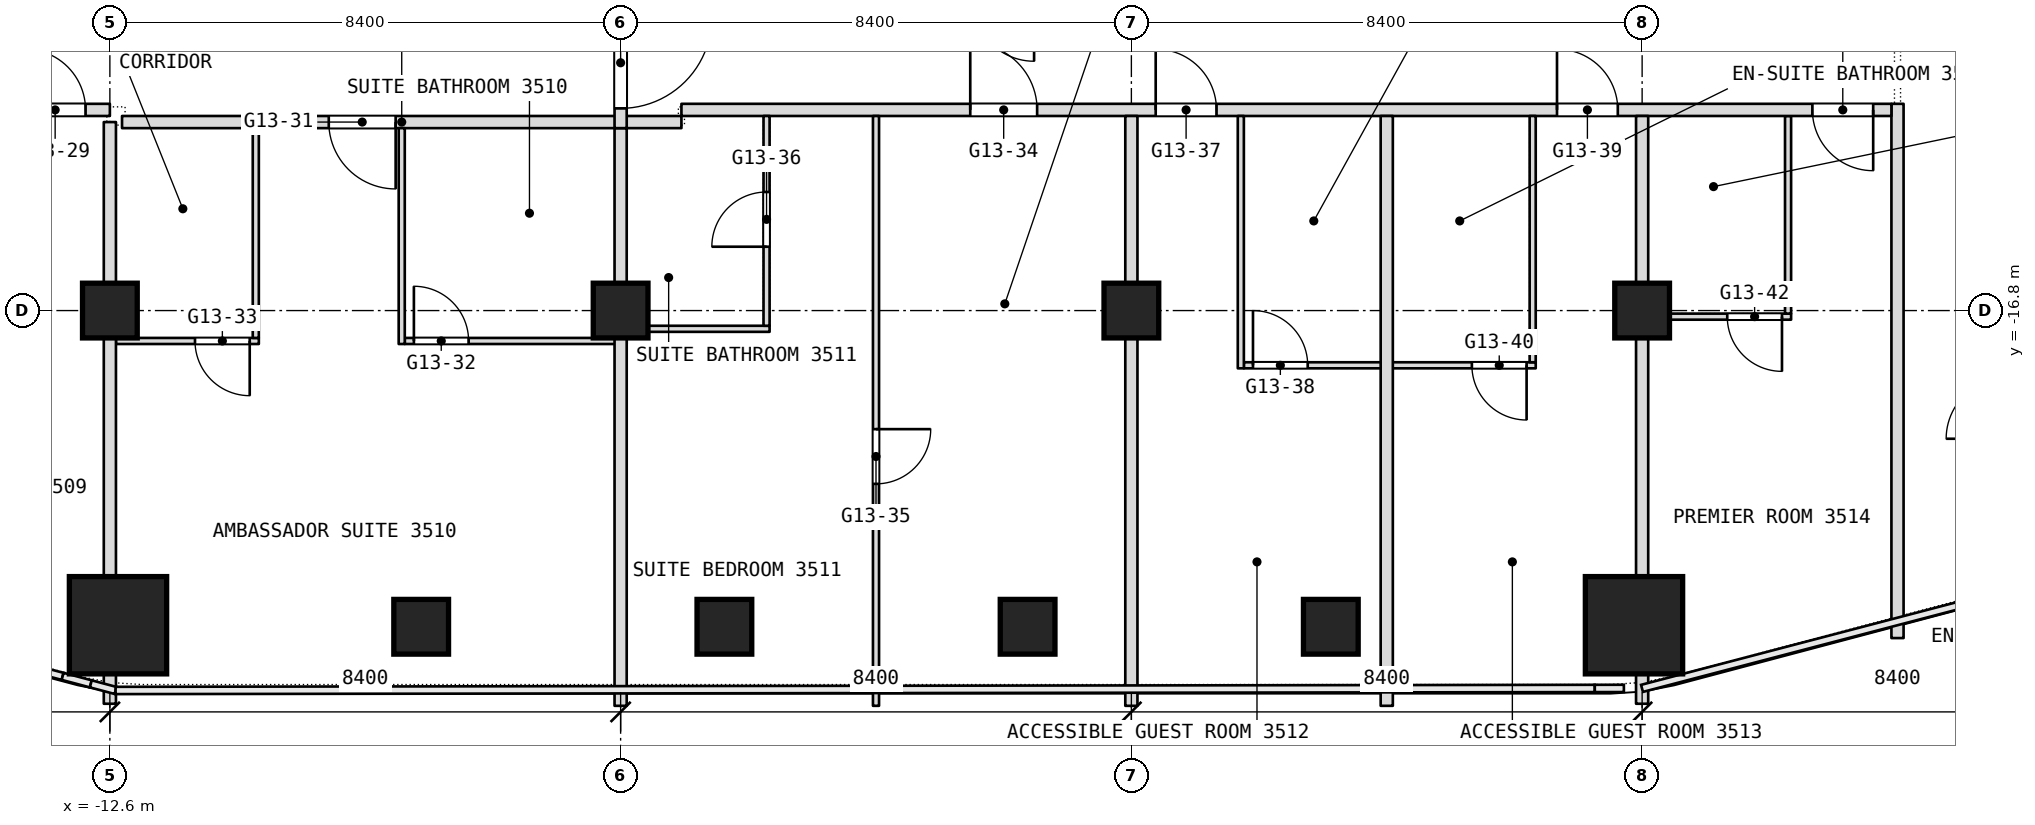
"""IFC4 building model, lengths in metres.
Left out: names, types, materials, properties, quantities, classifications, styles, units other than length and angle.
Written with IfcOpenShell. Run it as: python <this file> out.ifc"""

import sys

from ifc_helpers import new_model, si_unit, direction, frame, frame_2d, origin, origin_2d, place, context, subcontext, project, spatial, rectangle, extrude, element, fill, save


model = new_model("IFC4")
c1 = context("Model", 3, precision=1e-05, world=origin(), true_north=direction((0.0, 1.0)))
c2 = subcontext(c1, "Body", "Model", "MODEL_VIEW")
j1 = project(units=[si_unit("LENGTHUNIT", "METRE"), si_unit("PLANEANGLEUNIT", "RADIAN")], contexts=[c1])
p1 = place(None, origin())
s1 = spatial("IfcSite", under=j1, at=p1, CompositionType="ELEMENT")
p2 = place(p1, origin())
s2 = spatial("IfcBuilding", under=s1, at=p2, CompositionType="ELEMENT")
p3 = place(p2, frame((0.0, 0.0, 151.7)))
s3 = spatial("IfcBuildingStorey", under=s2, at=p3, CompositionType="ELEMENT", Elevation=151.7)
for number, where, z_axis, x_axis in (
    (1, (-12.466, -21.975, 0.0), (0.0, 0.0, 1.0), (1.0, 0.0, 0.0)),
    (2, (12.466, -21.975, 0.0), (0.0, 0.0, 1.0), (1.0, 0.0, 0.0)),
):
    element("IfcColumn", number, at=place(p3, frame(where, z_axis=z_axis, x_axis=x_axis)), inside=s3, PredefinedType="COLUMN", context=c2, shape_type="SweptSolid", body=[
        extrude(rectangle(XDim=1.6, YDim=1.6, at=origin_2d()), origin(), (0.0, 0.0, 1.0), 3.6),
    ])
for number, where, z_axis, x_axis in (
    (3, (-12.6, -16.8, 0.0), (0.0, 0.0, 1.0), (1.0, 0.0, 0.0)),
    (4, (-4.2, -16.8, 0.0), (0.0, 0.0, 1.0), (1.0, 0.0, 0.0)),
    (5, (4.2, -16.8, 0.0), (0.0, 0.0, 1.0), (1.0, 0.0, 0.0)),
    (6, (12.6, -16.8, 0.0), (0.0, 0.0, 1.0), (1.0, 0.0, 0.0)),
    (7, (7.48, -22.0, 0.0), (0.0, 0.0, 1.0), (1.0, 0.0, 0.0)),
    (8, (2.493, -22.0, 0.0), (0.0, 0.0, 1.0), (1.0, 0.0, 0.0)),
    (9, (-2.493, -22.0, 0.0), (0.0, 0.0, 1.0), (1.0, 0.0, 0.0)),
    (10, (-7.48, -22.0, 0.0), (0.0, 0.0, 1.0), (1.0, 0.0, 0.0)),
):
    element("IfcColumn", number, at=place(p3, frame(where, z_axis=z_axis, x_axis=x_axis)), inside=s3, PredefinedType="COLUMN", context=c2, shape_type="SweptSolid", body=[
        extrude(rectangle(XDim=0.9, YDim=0.9, at=origin_2d()), origin(), (0.0, 0.0, 1.0), 3.6),
    ])
p4 = place(p3, frame((6.05, -17.7, 0.0), z_axis=(0.0, 0.0, 1.0), x_axis=(1.0, 0.0, 0.0)))
e11 = element("IfcWall", 11, at=p4, inside=s3, PredefinedType="PARTITIONING", context=c2, shape_type="SweptSolid", body=[
    extrude(rectangle(XDim=4.8, YDim=0.1, at=frame_2d((2.4, 0.0))), origin(), (0.0, 0.0, 1.0), 3.34),
])
p5 = place(p4, frame((0.15, 0.0, 0.0)))
e12 = element("IfcOpeningElement", 12, at=p5, cuts=e11, PredefinedType="OPENING", context=c2, shape_type="SweptSolid", body=[
    extrude(rectangle(XDim=0.9, YDim=2.1, at=frame_2d((0.45, 1.05))), frame((0.0, 0.05, 0.0), z_axis=(0.0, -1.0, 0.0), x_axis=(1.0, 0.0, 0.0)), (0.0, 0.0, 1.0), 0.1),
])
p6 = place(p4, frame((3.75, 0.0, 0.0)))
e13 = element("IfcOpeningElement", 13, at=p6, cuts=e11, PredefinedType="OPENING", context=c2, shape_type="SweptSolid", body=[
    extrude(rectangle(XDim=0.9, YDim=2.1, at=frame_2d((0.45, 1.05))), frame((0.0, 0.05, 0.0), z_axis=(0.0, -1.0, 0.0), x_axis=(1.0, 0.0, 0.0)), (0.0, 0.0, 1.0), 0.1),
])
p7 = place(p3, frame((-12.5, -17.3, 0.0), z_axis=(0.0, 0.0, 1.0), x_axis=(1.0, 0.0, 0.0)))
e14 = element("IfcWall", 14, at=p7, inside=s3, PredefinedType="PARTITIONING", context=c2, shape_type="SweptSolid", body=[
    extrude(rectangle(XDim=2.35, YDim=0.1, at=frame_2d((1.175, 0.0))), origin(), (0.0, 0.0, 1.0), 3.34),
])
p8 = place(p7, frame((1.3, 0.0, 0.0)))
e15 = element("IfcOpeningElement", 15, at=p8, cuts=e14, PredefinedType="OPENING", context=c2, shape_type="SweptSolid", body=[
    extrude(rectangle(XDim=0.9, YDim=2.1, at=frame_2d((0.45, 1.05))), frame((0.0, 0.05, 0.0), z_axis=(0.0, -1.0, 0.0), x_axis=(1.0, 0.0, 0.0)), (0.0, 0.0, 1.0), 0.1),
])
p9 = place(p3, frame((-7.75, -17.3, 0.0), z_axis=(0.0, 0.0, 1.0), x_axis=(1.0, 0.0, 0.0)))
e16 = element("IfcWall", 16, at=p9, inside=s3, PredefinedType="PARTITIONING", context=c2, shape_type="SweptSolid", body=[
    extrude(rectangle(XDim=3.65, YDim=0.1, at=frame_2d((1.825, 0.0))), origin(), (0.0, 0.0, 1.0), 3.34),
])
p10 = place(p9, frame((0.15, 0.0, 0.0)))
e17 = element("IfcOpeningElement", 17, at=p10, cuts=e16, PredefinedType="OPENING", context=c2, shape_type="SweptSolid", body=[
    extrude(rectangle(XDim=0.9, YDim=2.1, at=frame_2d((0.45, 1.05))), frame((0.0, 0.05, 0.0), z_axis=(0.0, -1.0, 0.0), x_axis=(1.0, 0.0, 0.0)), (0.0, 0.0, 1.0), 0.1),
])
p11 = place(p3, frame((-4.1, -17.1, 0.0), z_axis=(0.0, 0.0, 1.0), x_axis=(1.0, 0.0, 0.0)))
e18 = element("IfcWall", 18, at=p11, inside=s3, PredefinedType="PARTITIONING", context=c2, shape_type="SweptSolid", body=[
    extrude(rectangle(XDim=2.35, YDim=0.1, at=frame_2d((1.175, 0.0))), origin(), (0.0, 0.0, 1.0), 3.34),
])
p12 = place(p3, frame((12.7, -16.9, 0.0), z_axis=(0.0, 0.0, 1.0), x_axis=(1.0, 0.0, 0.0)))
e19 = element("IfcWall", 19, at=p12, inside=s3, PredefinedType="PARTITIONING", context=c2, shape_type="SweptSolid", body=[
    extrude(rectangle(XDim=2.35, YDim=0.1, at=frame_2d((1.175, 0.0))), origin(), (0.0, 0.0, 1.0), 2.89),
])
p13 = place(p12, frame((1.3, 0.0, 0.0)))
e20 = element("IfcOpeningElement", 20, at=p13, cuts=e19, PredefinedType="OPENING", context=c2, shape_type="SweptSolid", body=[
    extrude(rectangle(XDim=0.9, YDim=2.1, at=frame_2d((0.45, 1.05))), frame((0.0, 0.05, 0.0), z_axis=(0.0, -1.0, 0.0), x_axis=(1.0, 0.0, 0.0)), (0.0, 0.0, 1.0), 0.1),
])
p14 = place(p3, frame((16.8, -22.186, 0.0), z_axis=(0.0, 0.0, 1.0), x_axis=(0.0, 1.0, 0.0)))
e21 = element("IfcWall", 21, at=p14, inside=s3, PredefinedType="PARTITIONING", context=c2, shape_type="SweptSolid", body=[
    extrude(rectangle(XDim=8.786, YDim=0.2, at=frame_2d((4.393, 0.0))), origin(), (0.0, 0.0, 1.0), 3.34),
])
p15 = place(p3, frame((15.0, -16.85, 0.0), z_axis=(0.0, 0.0, 1.0), x_axis=(0.0, 1.0, 0.0)))
e22 = element("IfcWall", 22, at=p15, inside=s3, PredefinedType="PARTITIONING", context=c2, shape_type="SweptSolid", body=[
    extrude(rectangle(XDim=3.25, YDim=0.1, at=frame_2d((1.625, 0.0))), origin(), (0.0, 0.0, 1.0), 3.34),
])
p16 = place(p3, frame((-12.4, -13.7, 0.0), z_axis=(0.0, 0.0, 1.0), x_axis=(1.0, 0.0, 0.0)))
e23 = element("IfcWall", 23, at=p16, inside=s3, PredefinedType="PARTITIONING", context=c2, shape_type="SweptSolid", body=[
    extrude(rectangle(XDim=9.2, YDim=0.2, at=frame_2d((4.6, 0.0))), origin(), (0.0, 0.0, 1.0), 3.34),
])
p17 = place(p16, frame((3.4, 0.0, 0.0)))
e24 = element("IfcOpeningElement", 24, at=p17, cuts=e23, PredefinedType="OPENING", context=c2, shape_type="SweptSolid", body=[
    extrude(rectangle(XDim=1.1, YDim=2.1, at=frame_2d((0.55, 1.05))), frame((0.0, 0.1, 0.0), z_axis=(0.0, -1.0, 0.0), x_axis=(1.0, 0.0, 0.0)), (0.0, 0.0, 1.0), 0.2),
])
p18 = place(p3, frame((-16.7, -13.5, 0.0), z_axis=(0.0, 0.0, 1.0), x_axis=(1.0, 0.0, 0.0)))
e25 = element("IfcWall", 25, at=p18, inside=s3, PredefinedType="PARTITIONING", context=c2, shape_type="SweptSolid", body=[
    extrude(rectangle(XDim=4.1, YDim=0.2, at=frame_2d((2.05, 0.0))), origin(), (0.0, 0.0, 1.0), 3.34),
])
p19 = place(p18, frame((2.7, 0.0, 0.0)))
e26 = element("IfcOpeningElement", 26, at=p19, cuts=e25, PredefinedType="OPENING", context=c2, shape_type="SweptSolid", body=[
    extrude(rectangle(XDim=1.0, YDim=2.1, at=frame_2d((0.5, 1.05))), frame((0.0, 0.1, 0.0), z_axis=(0.0, -1.0, 0.0), x_axis=(1.0, 0.0, 0.0)), (0.0, 0.0, 1.0), 0.2),
])
p20 = place(p3, frame((-3.2, -13.5, 0.0), z_axis=(0.0, 0.0, 1.0), x_axis=(1.0, 0.0, 0.0)))
e27 = element("IfcWall", 27, at=p20, inside=s3, PredefinedType="PARTITIONING", context=c2, shape_type="SweptSolid", body=[
    extrude(rectangle(XDim=19.9, YDim=0.2, at=frame_2d((9.95, 0.0))), origin(), (0.0, 0.0, 1.0), 3.34),
])
p21 = place(p20, frame((4.75, 0.0, 0.0)))
e28 = element("IfcOpeningElement", 28, at=p21, cuts=e27, PredefinedType="OPENING", context=c2, shape_type="SweptSolid", body=[
    extrude(rectangle(XDim=1.1, YDim=2.1, at=frame_2d((0.55, 1.05))), frame((0.0, 0.1, 0.0), z_axis=(0.0, -1.0, 0.0), x_axis=(1.0, 0.0, 0.0)), (0.0, 0.0, 1.0), 0.2),
])
p22 = place(p20, frame((7.8, 0.0, 0.0)))
e29 = element("IfcOpeningElement", 29, at=p22, cuts=e27, PredefinedType="OPENING", context=c2, shape_type="SweptSolid", body=[
    extrude(rectangle(XDim=1.0, YDim=2.1, at=frame_2d((0.5, 1.05))), frame((0.0, 0.1, 0.0), z_axis=(0.0, -1.0, 0.0), x_axis=(1.0, 0.0, 0.0)), (0.0, 0.0, 1.0), 0.2),
])
p23 = place(p20, frame((14.4, 0.0, 0.0)))
e30 = element("IfcOpeningElement", 30, at=p23, cuts=e27, PredefinedType="OPENING", context=c2, shape_type="SweptSolid", body=[
    extrude(rectangle(XDim=1.0, YDim=2.1, at=frame_2d((0.5, 1.05))), frame((0.0, 0.1, 0.0), z_axis=(0.0, -1.0, 0.0), x_axis=(1.0, 0.0, 0.0)), (0.0, 0.0, 1.0), 0.2),
])
p24 = place(p20, frame((18.6, 0.0, 0.0)))
e31 = element("IfcOpeningElement", 31, at=p24, cuts=e27, PredefinedType="OPENING", context=c2, shape_type="SweptSolid", body=[
    extrude(rectangle(XDim=1.0, YDim=2.1, at=frame_2d((0.5, 1.05))), frame((0.0, 0.1, 0.0), z_axis=(0.0, -1.0, 0.0), x_axis=(1.0, 0.0, 0.0)), (0.0, 0.0, 1.0), 0.2),
])
p25 = place(p3, frame((12.6, -23.266, 0.0), z_axis=(0.0, 0.0, 1.0), x_axis=(0.0, 1.0, 0.0)))
e32 = element("IfcWall", 32, at=p25, inside=s3, PredefinedType="PARTITIONING", context=c2, shape_type="SweptSolid", body=[
    extrude(rectangle(XDim=0.491, YDim=0.2, at=frame_2d((0.246, 0.0))), origin(), (0.0, 0.0, 1.0), 3.34),
])
p26 = place(p3, frame((12.6, -21.175, 0.0), z_axis=(0.0, 0.0, 1.0), x_axis=(0.0, 1.0, 0.0)))
e33 = element("IfcWall", 33, at=p26, inside=s3, PredefinedType="PARTITIONING", context=c2, shape_type="SweptSolid", body=[
    extrude(rectangle(XDim=7.575, YDim=0.2, at=frame_2d((3.788, 0.0))), origin(), (0.0, 0.0, 1.0), 3.34),
])
p27 = place(p3, frame((10.8, -17.65, 0.0), z_axis=(0.0, 0.0, 1.0), x_axis=(0.0, 1.0, 0.0)))
e34 = element("IfcWall", 34, at=p27, inside=s3, PredefinedType="PARTITIONING", context=c2, shape_type="SweptSolid", body=[
    extrude(rectangle(XDim=4.05, YDim=0.1, at=frame_2d((2.025, 0.0))), origin(), (0.0, 0.0, 1.0), 3.34),
])
p28 = place(p3, frame((8.4, -23.3, 0.0), z_axis=(0.0, 0.0, 1.0), x_axis=(0.0, 1.0, 0.0)))
e35 = element("IfcWall", 35, at=p28, inside=s3, PredefinedType="PARTITIONING", context=c2, shape_type="SweptSolid", body=[
    extrude(rectangle(XDim=9.7, YDim=0.2, at=frame_2d((4.85, 0.0))), origin(), (0.0, 0.0, 1.0), 3.34),
])
p29 = place(p3, frame((6.0, -17.75, 0.0), z_axis=(0.0, 0.0, 1.0), x_axis=(0.0, 1.0, 0.0)))
e36 = element("IfcWall", 36, at=p29, inside=s3, PredefinedType="PARTITIONING", context=c2, shape_type="SweptSolid", body=[
    extrude(rectangle(XDim=4.15, YDim=0.1, at=frame_2d((2.075, 0.0))), origin(), (0.0, 0.0, 1.0), 3.34),
])
p30 = place(p3, frame((4.2, -23.3, 0.0), z_axis=(0.0, 0.0, 1.0), x_axis=(0.0, 1.0, 0.0)))
e37 = element("IfcWall", 37, at=p30, inside=s3, PredefinedType="PARTITIONING", context=c2, shape_type="SweptSolid", body=[
    extrude(rectangle(XDim=9.7, YDim=0.2, at=frame_2d((4.85, 0.0))), origin(), (0.0, 0.0, 1.0), 3.34),
])
p31 = place(p3, frame((0.0, -23.3, 0.0), z_axis=(0.0, 0.0, 1.0), x_axis=(0.0, 1.0, 0.0)))
e38 = element("IfcWall", 38, at=p31, inside=s3, PredefinedType="PARTITIONING", context=c2, shape_type="SweptSolid", body=[
    extrude(rectangle(XDim=9.7, YDim=0.1, at=frame_2d((4.85, 0.0))), origin(), (0.0, 0.0, 1.0), 3.34),
])
p32 = place(p31, frame((3.65, 0.0, 0.0)))
e39 = element("IfcOpeningElement", 39, at=p32, cuts=e38, PredefinedType="OPENING", context=c2, shape_type="SweptSolid", body=[
    extrude(rectangle(XDim=0.9, YDim=2.1, at=frame_2d((0.45, 1.05))), frame((0.0, 0.05, 0.0), z_axis=(0.0, -1.0, 0.0), x_axis=(1.0, 0.0, 0.0)), (0.0, 0.0, 1.0), 0.1),
])
p33 = place(p3, frame((-1.8, -17.05, 0.0), z_axis=(0.0, 0.0, 1.0), x_axis=(0.0, 1.0, 0.0)))
e40 = element("IfcWall", 40, at=p33, inside=s3, PredefinedType="PARTITIONING", context=c2, shape_type="SweptSolid", body=[
    extrude(rectangle(XDim=3.45, YDim=0.1, at=frame_2d((1.725, 0.0))), origin(), (0.0, 0.0, 1.0), 3.34),
])
p34 = place(p33, frame((1.3, 0.0, 0.0)))
e41 = element("IfcOpeningElement", 41, at=p34, cuts=e40, PredefinedType="OPENING", context=c2, shape_type="SweptSolid", body=[
    extrude(rectangle(XDim=0.9, YDim=2.1, at=frame_2d((0.45, 1.05))), frame((0.0, 0.05, 0.0), z_axis=(0.0, -1.0, 0.0), x_axis=(1.0, 0.0, 0.0)), (0.0, 0.0, 1.0), 0.1),
])
p35 = place(p3, frame((-4.2, -23.3, 0.0), z_axis=(0.0, 0.0, 1.0), x_axis=(0.0, 1.0, 0.0)))
e42 = element("IfcWall", 42, at=p35, inside=s3, PredefinedType="PARTITIONING", context=c2, shape_type="SweptSolid", body=[
    extrude(rectangle(XDim=9.5, YDim=0.2, at=frame_2d((4.75, 0.0))), origin(), (0.0, 0.0, 1.0), 3.34),
])
p36 = place(p3, frame((-4.2, -13.8, 0.0), z_axis=(0.0, 0.0, 1.0), x_axis=(0.0, 1.0, 0.0)))
e43 = element("IfcWall", 43, at=p36, inside=s3, PredefinedType="PARTITIONING", context=c2, shape_type="SweptSolid", body=[
    extrude(rectangle(XDim=13.8, YDim=0.2, at=frame_2d((6.9, 0.0))), origin(), (0.0, 0.0, 1.0), 3.34),
])
p37 = place(p36, frame((12.15, 0.0, 0.0)))
e44 = element("IfcOpeningElement", 44, at=p37, cuts=e43, PredefinedType="OPENING", context=c2, shape_type="SweptSolid", body=[
    extrude(rectangle(XDim=1.5, YDim=2.1, at=frame_2d((0.75, 1.05))), frame((0.0, 0.1, 0.0), z_axis=(0.0, -1.0, 0.0), x_axis=(1.0, 0.0, 0.0)), (0.0, 0.0, 1.0), 0.2),
])
p38 = place(p36, frame((0.325, 0.0, 0.0)))
e45 = element("IfcOpeningElement", 45, at=p38, cuts=e43, PredefinedType="OPENING", context=c2, shape_type="SweptSolid", body=[
    extrude(rectangle(XDim=1.5, YDim=2.1, at=frame_2d((0.75, 1.05))), frame((0.0, 0.1, 0.0), z_axis=(0.0, -1.0, 0.0), x_axis=(1.0, 0.0, 0.0)), (0.0, 0.0, 1.0), 0.2),
])
p39 = place(p3, frame((-7.8, -17.35, 0.0), z_axis=(0.0, 0.0, 1.0), x_axis=(0.0, 1.0, 0.0)))
e46 = element("IfcWall", 46, at=p39, inside=s3, PredefinedType="PARTITIONING", context=c2, shape_type="SweptSolid", body=[
    extrude(rectangle(XDim=3.55, YDim=0.1, at=frame_2d((1.775, 0.0))), origin(), (0.0, 0.0, 1.0), 3.34),
])
p40 = place(p3, frame((-10.2, -17.25, 0.0), z_axis=(0.0, 0.0, 1.0), x_axis=(0.0, 1.0, 0.0)))
e47 = element("IfcWall", 47, at=p40, inside=s3, PredefinedType="PARTITIONING", context=c2, shape_type="SweptSolid", body=[
    extrude(rectangle(XDim=3.45, YDim=0.1, at=frame_2d((1.725, 0.0))), origin(), (0.0, 0.0, 1.0), 3.34),
])
p41 = place(p3, frame((-12.6, -23.266, 0.0), z_axis=(0.0, 0.0, 1.0), x_axis=(0.0, 1.0, 0.0)))
e48 = element("IfcWall", 48, at=p41, inside=s3, PredefinedType="PARTITIONING", context=c2, shape_type="SweptSolid", body=[
    extrude(rectangle(XDim=0.491, YDim=0.2, at=frame_2d((0.246, 0.0))), origin(), (0.0, 0.0, 1.0), 3.34),
])
p42 = place(p3, frame((-12.6, -21.175, 0.0), z_axis=(0.0, 0.0, 1.0), x_axis=(0.0, 1.0, 0.0)))
e49 = element("IfcWall", 49, at=p42, inside=s3, PredefinedType="PARTITIONING", context=c2, shape_type="SweptSolid", body=[
    extrude(rectangle(XDim=7.475, YDim=0.2, at=frame_2d((3.738, 0.0))), origin(), (0.0, 0.0, 1.0), 3.34),
])
p43 = place(p5, origin())
e50 = element("IfcDoor", 50, at=p43, inside=s3, OperationType="SINGLE_SWING_LEFT", PredefinedType="DOOR", context=c2, shape_type="SweptSolid", body=[
    extrude(rectangle(XDim=0.9, YDim=2.1, at=frame_2d((0.45, 1.05))), frame((0.0, 0.025, 0.0), z_axis=(0.0, -1.0, 0.0), x_axis=(1.0, 0.0, 0.0)), (0.0, 0.0, 1.0), 0.05),
])
fill(e12, e50)
p44 = place(p6, origin())
e51 = element("IfcDoor", 51, at=p44, inside=s3, OperationType="SINGLE_SWING_RIGHT", PredefinedType="DOOR", context=c2, shape_type="SweptSolid", body=[
    extrude(rectangle(XDim=0.9, YDim=2.1, at=frame_2d((0.45, 1.05))), frame((0.0, 0.025, 0.0), z_axis=(0.0, -1.0, 0.0), x_axis=(1.0, 0.0, 0.0)), (0.0, 0.0, 1.0), 0.05),
])
fill(e13, e51)
p45 = place(p8, origin())
e52 = element("IfcDoor", 52, at=p45, inside=s3, OperationType="SINGLE_SWING_RIGHT", PredefinedType="DOOR", context=c2, shape_type="SweptSolid", body=[
    extrude(rectangle(XDim=0.9, YDim=2.1, at=frame_2d((0.45, 1.05))), frame((0.0, 0.025, 0.0), z_axis=(0.0, -1.0, 0.0), x_axis=(1.0, 0.0, 0.0)), (0.0, 0.0, 1.0), 0.05),
])
fill(e15, e52)
p46 = place(p10, origin())
e53 = element("IfcDoor", 53, at=p46, inside=s3, OperationType="SINGLE_SWING_LEFT", PredefinedType="DOOR", context=c2, shape_type="SweptSolid", body=[
    extrude(rectangle(XDim=0.9, YDim=2.1, at=frame_2d((0.45, 1.05))), frame((0.0, 0.025, 0.0), z_axis=(0.0, -1.0, 0.0), x_axis=(1.0, 0.0, 0.0)), (0.0, 0.0, 1.0), 0.05),
])
fill(e17, e53)
p47 = place(p13, origin())
e54 = element("IfcDoor", 54, at=p47, inside=s3, OperationType="SINGLE_SWING_RIGHT", PredefinedType="DOOR", context=c2, shape_type="SweptSolid", body=[
    extrude(rectangle(XDim=0.9, YDim=2.1, at=frame_2d((0.45, 1.05))), frame((0.0, 0.025, 0.0), z_axis=(0.0, -1.0, 0.0), x_axis=(1.0, 0.0, 0.0)), (0.0, 0.0, 1.0), 0.05),
])
fill(e20, e54)
p48 = place(p17, origin())
e55 = element("IfcDoor", 55, at=p48, inside=s3, OperationType="SINGLE_SWING_LEFT", PredefinedType="DOOR", context=c2, shape_type="SweptSolid", body=[
    extrude(rectangle(XDim=1.1, YDim=2.1, at=frame_2d((0.55, 1.05))), frame((0.0, 0.025, 0.0), z_axis=(0.0, -1.0, 0.0), x_axis=(1.0, 0.0, 0.0)), (0.0, 0.0, 1.0), 0.05),
])
fill(e24, e55)
p49 = place(p19, origin())
e56 = element("IfcDoor", 56, at=p49, inside=s3, OperationType="SINGLE_SWING_LEFT", PredefinedType="DOOR", context=c2, shape_type="SweptSolid", body=[
    extrude(rectangle(XDim=1.0, YDim=2.1, at=frame_2d((0.5, 1.05))), frame((0.0, 0.025, 0.0), z_axis=(0.0, -1.0, 0.0), x_axis=(1.0, 0.0, 0.0)), (0.0, 0.0, 1.0), 0.05),
])
fill(e26, e56)
p50 = place(p21, origin())
e57 = element("IfcDoor", 57, at=p50, inside=s3, OperationType="SINGLE_SWING_RIGHT", PredefinedType="DOOR", context=c2, shape_type="SweptSolid", body=[
    extrude(rectangle(XDim=1.1, YDim=2.1, at=frame_2d((0.55, 1.05))), frame((0.0, 0.025, 0.0), z_axis=(0.0, -1.0, 0.0), x_axis=(1.0, 0.0, 0.0)), (0.0, 0.0, 1.0), 0.05),
])
fill(e28, e57)
p51 = place(p22, origin())
e58 = element("IfcDoor", 58, at=p51, inside=s3, OperationType="SINGLE_SWING_LEFT", PredefinedType="DOOR", context=c2, shape_type="SweptSolid", body=[
    extrude(rectangle(XDim=1.0, YDim=2.1, at=frame_2d((0.5, 1.05))), frame((0.0, 0.025, 0.0), z_axis=(0.0, -1.0, 0.0), x_axis=(1.0, 0.0, 0.0)), (0.0, 0.0, 1.0), 0.05),
])
fill(e29, e58)
p52 = place(p23, origin())
e59 = element("IfcDoor", 59, at=p52, inside=s3, OperationType="SINGLE_SWING_LEFT", PredefinedType="DOOR", context=c2, shape_type="SweptSolid", body=[
    extrude(rectangle(XDim=1.0, YDim=2.1, at=frame_2d((0.5, 1.05))), frame((0.0, 0.025, 0.0), z_axis=(0.0, -1.0, 0.0), x_axis=(1.0, 0.0, 0.0)), (0.0, 0.0, 1.0), 0.05),
])
fill(e30, e59)
p53 = place(p24, origin())
e60 = element("IfcDoor", 60, at=p53, inside=s3, OperationType="SINGLE_SWING_LEFT", PredefinedType="DOOR", context=c2, shape_type="SweptSolid", body=[
    extrude(rectangle(XDim=1.0, YDim=2.1, at=frame_2d((0.5, 1.05))), frame((0.0, 0.025, 0.0), z_axis=(0.0, -1.0, 0.0), x_axis=(1.0, 0.0, 0.0)), (0.0, 0.0, 1.0), 0.05),
])
fill(e31, e60)
p54 = place(p32, origin())
e61 = element("IfcDoor", 61, at=p54, inside=s3, OperationType="SINGLE_SWING_RIGHT", PredefinedType="DOOR", context=c2, shape_type="SweptSolid", body=[
    extrude(rectangle(XDim=0.9, YDim=2.1, at=frame_2d((0.45, 1.05))), frame((0.0, 0.025, 0.0), z_axis=(0.0, -1.0, 0.0), x_axis=(1.0, 0.0, 0.0)), (0.0, 0.0, 1.0), 0.05),
])
fill(e39, e61)
p55 = place(p34, origin())
e62 = element("IfcDoor", 62, at=p55, inside=s3, OperationType="SINGLE_SWING_LEFT", PredefinedType="DOOR", context=c2, shape_type="SweptSolid", body=[
    extrude(rectangle(XDim=0.9, YDim=2.1, at=frame_2d((0.45, 1.05))), frame((0.0, 0.025, 0.0), z_axis=(0.0, -1.0, 0.0), x_axis=(1.0, 0.0, 0.0)), (0.0, 0.0, 1.0), 0.05),
])
fill(e41, e62)
p56 = place(p38, origin())
e63 = element("IfcDoor", 63, at=p56, inside=s3, OperationType="DOUBLE_DOOR_DOUBLE_SWING", PredefinedType="DOOR", context=c2, shape_type="SweptSolid", body=[
    extrude(rectangle(XDim=1.5, YDim=2.1, at=frame_2d((0.75, 1.05))), frame((0.0, 0.025, 0.0), z_axis=(0.0, -1.0, 0.0), x_axis=(1.0, 0.0, 0.0)), (0.0, 0.0, 1.0), 0.05),
])
fill(e45, e63)
save(model, sys.argv[1])
